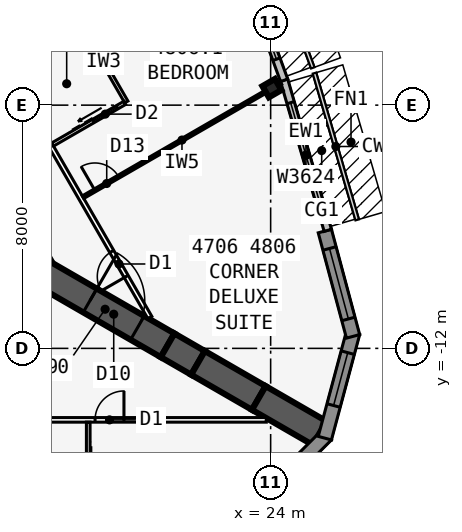
"""IFC4 building model, lengths in metres.
Left out: names, types, materials, properties, quantities, classifications, styles, units other than length and angle.
Written with IfcOpenShell. Run it as: python <this file> out.ifc"""

import sys

from ifc_helpers import new_model, si_unit, direction, frame, frame_2d, origin, origin_2d, place, context, subcontext, project, spatial, polyline, rectangle, i_section, outline, extrude, element, fill, save


model = new_model("IFC4")
c1 = context("Model", 3, precision=1e-05, world=origin(), true_north=direction((0.0, 1.0)))
c2 = subcontext(c1, "Body", "Model", "MODEL_VIEW")
j1 = project(units=[si_unit("LENGTHUNIT", "METRE"), si_unit("PLANEANGLEUNIT", "RADIAN")], contexts=[c1])
p1 = place(None, origin())
s1 = spatial("IfcSite", under=j1, at=p1, CompositionType="ELEMENT")
p2 = place(p1, origin())
s2 = spatial("IfcBuilding", under=s1, at=p2, CompositionType="ELEMENT")
p3 = place(p2, frame((0.0, 0.0, 175.9)))
s3 = spatial("IfcBuildingStorey", under=s2, at=p3, CompositionType="ELEMENT", Elevation=175.9)
p4 = place(p3, frame((16.5, -9.526, 0.0), z_axis=(0.0, 0.0, 1.0), x_axis=(-0.499999749417, 0.866025548458, 0.0)))
e1 = element("IfcWall", 1, at=p4, inside=s3, PredefinedType="SHEAR", context=c2, shape_type="SweptSolid", body=[
    extrude(rectangle(XDim=33.0, YDim=0.9, at=frame_2d((16.5, 0.0))), origin(), (0.0, 0.0, 1.0), 3.4),
])
p5 = place(p4, frame((14.15, 0.0, 0.0)))
e2 = element("IfcOpeningElement", 2, at=p5, cuts=e1, PredefinedType="OPENING", context=c2, shape_type="SweptSolid", body=[
    extrude(rectangle(XDim=1.8, YDim=2.13, at=frame_2d((0.9, 1.065))), frame((0.0, 0.46, 0.0), z_axis=(0.0, -1.0, 0.0), x_axis=(1.0, 0.0, 0.0)), (0.0, 0.0, 1.0), 0.92),
])
p6 = place(p4, frame((12.6, 0.0, 0.0)))
e3 = element("IfcOpeningElement", 3, at=p6, cuts=e1, PredefinedType="OPENING", context=c2, shape_type="SweptSolid", body=[
    extrude(rectangle(XDim=1.0, YDim=2.13, at=frame_2d((0.5, 1.065))), frame((0.0, 0.46, 0.0), z_axis=(0.0, -1.0, 0.0), x_axis=(1.0, 0.0, 0.0)), (0.0, 0.0, 1.0), 0.92),
])
p7 = place(p3, frame((16.5, -9.526, 0.0), z_axis=(0.0, 0.0, 1.0), x_axis=(0.866031398331, -0.499989616998, 0.0)))
e4 = element("IfcWall", 4, at=p7, inside=s3, PredefinedType="SHEAR", context=c2, shape_type="SweptSolid", body=[
    extrude(rectangle(XDim=4.746, YDim=0.9, at=frame_2d((2.373, 0.0))), origin(), (0.0, 0.0, 1.0), 3.4),
])
p8 = place(p7, frame((1.8, 0.0, 0.0)))
e5 = element("IfcOpeningElement", 5, at=p8, cuts=e4, PredefinedType="OPENING", context=c2, shape_type="SweptSolid", body=[
    extrude(rectangle(XDim=1.8, YDim=2.13, at=frame_2d((0.9, 1.065))), frame((0.0, 0.46, 0.0), z_axis=(0.0, -1.0, 0.0), x_axis=(1.0, 0.0, 0.0)), (0.0, 0.0, 1.0), 0.92),
])
p9 = place(p3, frame((20.61, -11.899, 0.0), z_axis=(0.0, 0.0, 1.0), x_axis=(0.866009537788, -0.500027479704, 0.0)))
e6 = element("IfcWall", 6, at=p9, inside=s3, PredefinedType="SHEAR", context=c2, shape_type="SweptSolid", body=[
    extrude(rectangle(XDim=1.155, YDim=0.9, at=frame_2d((0.577, 0.0))), origin(), (0.0, 0.0, 1.0), 3.4),
])
for number, where, z_axis, x_axis in (
    (7, (21.61, -12.477, 0.0), (0.0, 0.0, 1.0), (0.866, -0.5, 0.0)),
    (8, (23.61, -13.631, 0.0), (0.0, 0.0, 1.0), (0.866, -0.5, 0.0)),
):
    element("IfcWall", number, at=place(p3, frame(where, z_axis=z_axis, x_axis=x_axis)), inside=s3, PredefinedType="SHEAR", context=c2, shape_type="SweptSolid", body=[
        extrude(rectangle(XDim=2.309, YDim=0.9, at=frame_2d((1.155, 0.0))), origin(), (0.0, 0.0, 1.0), 3.4),
    ])
p10 = place(p3, frame((24.041, -3.44, 0.0), z_axis=(0.0, 0.0, 1.0), x_axis=(-0.5, 0.866025403784, 0.0)))
e9 = element("IfcColumn", 9, at=p10, inside=s3, PredefinedType="COLUMN", context=c2, shape_type="SweptSolid", body=[
    extrude(i_section(OverallWidth=0.424, OverallDepth=0.475, WebThickness=0.048, FlangeThickness=0.077, at=origin_2d()), origin(), (0.0, 0.0, 1.0), 3.4),
])
p11 = place(p3, frame((23.305, -17.388, 0.0), z_axis=(0.0, 0.0, 1.0), x_axis=(0.707106781187, 0.707106781187, 0.0)))
e10 = element("IfcWall", 10, at=p11, inside=s3, PredefinedType="SOLIDWALL", context=c2, shape_type="SweptSolid", body=[
    extrude(outline(polyline([(3.586, 0.225), (3.527, 0.225), (3.035, 0.093), (3.0, 0.225), (0.0, 0.225), (0.0, -0.225), (3.586, -0.225), (3.586, 0.225)])), origin(), (0.0, 0.0, 1.0), 3.235),
])
p12 = place(p11, frame((0.675, 0.0, 0.45)))
e11 = element("IfcOpeningElement", 11, at=p12, cuts=e10, PredefinedType="OPENING", context=c2, shape_type="SweptSolid", body=[
    extrude(rectangle(XDim=1.8, YDim=2.4, at=frame_2d((0.9, 1.2))), frame((0.0, 0.235, 0.0), z_axis=(0.0, -1.0, 0.0), x_axis=(1.0, 0.0, 0.0)), (0.0, 0.0, 1.0), 0.47),
])
p13 = place(p3, frame((25.783, -14.953, 0.0), z_axis=(0.0, 0.0, 1.0), x_axis=(0.258823421857, 0.965924653531, 0.0)))
e12 = element("IfcWall", 12, at=p13, inside=s3, PredefinedType="SOLIDWALL", context=c2, shape_type="SweptSolid", body=[
    extrude(outline(polyline([(3.586, 0.225), (0.586, 0.225), (0.551, 0.093), (0.06, 0.225), (0.0, 0.225), (0.0, -0.225), (3.586, -0.225), (3.586, 0.225)])), origin(), (0.0, 0.0, 1.0), 3.235),
])
p14 = place(p13, frame((1.111, 0.0, 0.45)))
e13 = element("IfcOpeningElement", 13, at=p14, cuts=e12, PredefinedType="OPENING", context=c2, shape_type="SweptSolid", body=[
    extrude(rectangle(XDim=1.8, YDim=2.4, at=frame_2d((0.9, 1.2))), frame((0.0, 0.235, 0.0), z_axis=(0.0, -1.0, 0.0), x_axis=(1.0, 0.0, 0.0)), (0.0, 0.0, 1.0), 0.47),
])
p15 = place(p3, frame((26.711, -11.605, 0.0), z_axis=(0.0, 0.0, 1.0), x_axis=(-0.258823421857, 0.965924653531, 0.0)))
e14 = element("IfcWall", 14, at=p15, inside=s3, PredefinedType="SOLIDWALL", context=c2, shape_type="SweptSolid", body=[
    extrude(rectangle(XDim=3.586, YDim=0.45, at=frame_2d((1.793, 0.0))), origin(), (0.0, 0.0, 1.0), 3.235),
])
p16 = place(p15, frame((0.593, 0.0, 0.45)))
e15 = element("IfcOpeningElement", 15, at=p16, cuts=e14, PredefinedType="OPENING", context=c2, shape_type="SweptSolid", body=[
    extrude(rectangle(XDim=2.4, YDim=2.4, at=frame_2d((1.2, 1.2))), frame((0.0, 0.235, 0.0), z_axis=(0.0, -1.0, 0.0), x_axis=(1.0, 0.0, 0.0)), (0.0, 0.0, 1.0), 0.47),
])
p17 = place(p3, frame((25.88, -8.118, 0.0), z_axis=(0.0, 0.0, 1.0), x_axis=(-0.279528287117, 0.960137457191, 0.0)))
e16 = element("IfcWall", 16, at=p17, inside=s3, PredefinedType="STANDARD", context=c2, shape_type="SweptSolid", body=[
    extrude(rectangle(XDim=5.148, YDim=0.25, at=frame_2d((2.574, 0.0))), origin(), (0.0, 0.0, 1.0), 3.235),
])
p18 = place(p17, frame((0.774, 0.0, 0.45)))
e17 = element("IfcOpeningElement", 17, at=p18, cuts=e16, PredefinedType="OPENING", context=c2, shape_type="SweptSolid", body=[
    extrude(rectangle(XDim=3.6, YDim=2.4, at=frame_2d((1.8, 1.2))), frame((0.0, 0.135, 0.0), z_axis=(0.0, -1.0, 0.0), x_axis=(1.0, 0.0, 0.0)), (0.0, 0.0, 1.0), 0.27),
])
p19 = place(p3, frame((24.444, -3.183, 0.0), z_axis=(0.0, 0.0, 1.0), x_axis=(-0.343225593282, 0.939252996863, 0.0)))
e18 = element("IfcWall", 18, at=p19, inside=s3, PredefinedType="STANDARD", context=c2, shape_type="SweptSolid", body=[
    extrude(rectangle(XDim=5.076, YDim=0.25, at=frame_2d((2.538, 0.0))), origin(), (0.0, 0.0, 1.0), 3.235),
])
p20 = place(p19, frame((0.738, 0.0, 0.45)))
e19 = element("IfcOpeningElement", 19, at=p20, cuts=e18, PredefinedType="OPENING", context=c2, shape_type="SweptSolid", body=[
    extrude(rectangle(XDim=3.6, YDim=2.4, at=frame_2d((1.8, 1.2))), frame((0.0, 0.135, 0.0), z_axis=(0.0, -1.0, 0.0), x_axis=(1.0, 0.0, 0.0)), (0.0, 0.0, 1.0), 0.27),
])
p21 = place(p3, frame((-23.857, -14.351, 0.0), z_axis=(0.0, 0.0, 1.0), x_axis=(1.0, 0.0, 0.0)))
e20 = element("IfcWall", 20, at=p21, inside=s3, PredefinedType="PARTITIONING", context=c2, shape_type="SweptSolid", body=[
    extrude(rectangle(XDim=47.714, YDim=0.15, at=frame_2d((23.857, 0.0))), origin(), (0.0, 0.0, 1.0), 3.235),
])
p22 = place(p21, frame((4.682, 0.0, 0.0)))
e21 = element("IfcOpeningElement", 21, at=p22, cuts=e20, PredefinedType="OPENING", context=c2, shape_type="SweptSolid", body=[
    extrude(rectangle(XDim=0.95, YDim=2.13, at=frame_2d((0.475, 1.065))), frame((0.0, 0.085, 0.0), z_axis=(0.0, -1.0, 0.0), x_axis=(1.0, 0.0, 0.0)), (0.0, 0.0, 1.0), 0.17),
])
p23 = place(p21, frame((10.282, 0.0, 0.0)))
e22 = element("IfcOpeningElement", 22, at=p23, cuts=e20, PredefinedType="OPENING", context=c2, shape_type="SweptSolid", body=[
    extrude(rectangle(XDim=0.95, YDim=2.13, at=frame_2d((0.475, 1.065))), frame((0.0, 0.085, 0.0), z_axis=(0.0, -1.0, 0.0), x_axis=(1.0, 0.0, 0.0)), (0.0, 0.0, 1.0), 0.17),
])
p24 = place(p21, frame((17.082, 0.0, 0.0)))
e23 = element("IfcOpeningElement", 23, at=p24, cuts=e20, PredefinedType="OPENING", context=c2, shape_type="SweptSolid", body=[
    extrude(rectangle(XDim=0.95, YDim=2.13, at=frame_2d((0.475, 1.065))), frame((0.0, 0.085, 0.0), z_axis=(0.0, -1.0, 0.0), x_axis=(1.0, 0.0, 0.0)), (0.0, 0.0, 1.0), 0.17),
])
p25 = place(p21, frame((25.857, 0.0, 0.0)))
e24 = element("IfcOpeningElement", 24, at=p25, cuts=e20, PredefinedType="OPENING", context=c2, shape_type="SweptSolid", body=[
    extrude(rectangle(XDim=1.0, YDim=2.13, at=frame_2d((0.5, 1.065))), frame((0.0, 0.085, 0.0), z_axis=(0.0, -1.0, 0.0), x_axis=(1.0, 0.0, 0.0)), (0.0, 0.0, 1.0), 0.17),
])
p26 = place(p21, frame((34.682, 0.0, 0.0)))
e25 = element("IfcOpeningElement", 25, at=p26, cuts=e20, PredefinedType="OPENING", context=c2, shape_type="SweptSolid", body=[
    extrude(rectangle(XDim=0.95, YDim=2.13, at=frame_2d((0.475, 1.065))), frame((0.0, 0.085, 0.0), z_axis=(0.0, -1.0, 0.0), x_axis=(1.0, 0.0, 0.0)), (0.0, 0.0, 1.0), 0.17),
])
p27 = place(p21, frame((42.082, 0.0, 0.0)))
e26 = element("IfcOpeningElement", 26, at=p27, cuts=e20, PredefinedType="OPENING", context=c2, shape_type="SweptSolid", body=[
    extrude(rectangle(XDim=0.95, YDim=2.13, at=frame_2d((0.475, 1.065))), frame((0.0, 0.085, 0.0), z_axis=(0.0, -1.0, 0.0), x_axis=(1.0, 0.0, 0.0)), (0.0, 0.0, 1.0), 0.17),
])
p28 = place(p3, frame((18.0, -14.426, 0.0), z_axis=(0.0, 0.0, 1.0), x_axis=(0.0, -1.0, 0.0)))
e27 = element("IfcWall", 27, at=p28, inside=s3, PredefinedType="PLUMBINGWALL", context=c2, shape_type="SweptSolid", body=[
    extrude(rectangle(XDim=2.74, YDim=0.12, at=frame_2d((1.37, 0.0))), origin(), (0.0, 0.0, 1.0), 3.235),
])
p29 = place(p28, frame((1.55, 0.0, 0.0)))
e28 = element("IfcOpeningElement", 28, at=p29, cuts=e27, PredefinedType="OPENING", context=c2, shape_type="SweptSolid", body=[
    extrude(rectangle(XDim=0.9, YDim=2.13, at=frame_2d((0.45, 1.065))), frame((0.0, 0.07, 0.0), z_axis=(0.0, -1.0, 0.0), x_axis=(1.0, 0.0, 0.0)), (0.0, 0.0, 1.0), 0.14),
])
p30 = place(p3, frame((20.027, -10.985, 0.0), z_axis=(0.0, 0.0, 1.0), x_axis=(-0.500001677587, 0.866024435227, 0.0)))
e29 = element("IfcWall", 29, at=p30, inside=s3, PredefinedType="PARTITIONING", context=c2, shape_type="SweptSolid", body=[
    extrude(rectangle(XDim=39.054, YDim=0.15, at=frame_2d((19.527, 0.0))), origin(), (0.0, 0.0, 1.0), 3.235),
])
p31 = place(p30, frame((1.558, 0.0, 0.0)))
e30 = element("IfcOpeningElement", 30, at=p31, cuts=e29, PredefinedType="OPENING", context=c2, shape_type="SweptSolid", body=[
    extrude(rectangle(XDim=0.95, YDim=2.13, at=frame_2d((0.475, 1.065))), frame((0.0, 0.085, 0.0), z_axis=(0.0, -1.0, 0.0), x_axis=(1.0, 0.0, 0.0)), (0.0, 0.0, 1.0), 0.17),
])
p32 = place(p30, frame((11.552, 0.0, 0.0)))
e31 = element("IfcOpeningElement", 31, at=p32, cuts=e29, PredefinedType="OPENING", context=c2, shape_type="SweptSolid", body=[
    extrude(rectangle(XDim=0.95, YDim=2.13, at=frame_2d((0.475, 1.065))), frame((0.0, 0.085, 0.0), z_axis=(0.0, -1.0, 0.0), x_axis=(1.0, 0.0, 0.0)), (0.0, 0.0, 1.0), 0.17),
])
p33 = place(p30, frame((25.352, 0.0, 0.0)))
e32 = element("IfcOpeningElement", 32, at=p33, cuts=e29, PredefinedType="OPENING", context=c2, shape_type="SweptSolid", body=[
    extrude(rectangle(XDim=0.95, YDim=2.13, at=frame_2d((0.475, 1.065))), frame((0.0, 0.085, 0.0), z_axis=(0.0, -1.0, 0.0), x_axis=(1.0, 0.0, 0.0)), (0.0, 0.0, 1.0), 0.17),
])
p34 = place(p30, frame((36.546, 0.0, 0.0)))
e33 = element("IfcOpeningElement", 33, at=p34, cuts=e29, PredefinedType="OPENING", context=c2, shape_type="SweptSolid", body=[
    extrude(rectangle(XDim=0.95, YDim=2.13, at=frame_2d((0.475, 1.065))), frame((0.0, 0.085, 0.0), z_axis=(0.0, -1.0, 0.0), x_axis=(1.0, 0.0, 0.0)), (0.0, 0.0, 1.0), 0.17),
])
p35 = place(p3, frame((17.829, -7.027, 0.0), z_axis=(0.0, 0.0, 1.0), x_axis=(0.866029804378, 0.499992377871, 0.0)))
e34 = element("IfcWall", 34, at=p35, inside=s3, PredefinedType="PARTITIONING", context=c2, shape_type="SweptSolid", body=[
    extrude(rectangle(XDim=7.516, YDim=0.1, at=frame_2d((3.758, 0.0))), origin(), (0.0, 0.0, 1.0), 2.389),
])
p36 = place(p35, frame((0.45, 0.0, 0.0)))
e35 = element("IfcOpeningElement", 35, at=p36, cuts=e34, PredefinedType="OPENING", context=c2, shape_type="SweptSolid", body=[
    extrude(rectangle(XDim=0.9, YDim=2.13, at=frame_2d((0.45, 1.065))), frame((0.0, 0.06, 0.0), z_axis=(0.0, -1.0, 0.0), x_axis=(1.0, 0.0, 0.0)), (0.0, 0.0, 1.0), 0.12),
])
p37 = place(p3, frame((15.329, -2.697, 0.0), z_axis=(0.0, 0.0, 1.0), x_axis=(0.866024316602, 0.50000188305, 0.0)))
e36 = element("IfcWall", 36, at=p37, inside=s3, PredefinedType="PARTITIONING", context=c2, shape_type="SweptSolid", body=[
    extrude(rectangle(XDim=8.395, YDim=0.15, at=frame_2d((4.198, 0.0))), origin(), (0.0, 0.0, 1.0), 2.389),
])
p38 = place(p3, frame((19.253, -3.895, 0.0), z_axis=(0.0, 0.0, 1.0), x_axis=(-0.499990139034, 0.866031096941, 0.0)))
e37 = element("IfcWall", 37, at=p38, inside=s3, PredefinedType="PLUMBINGWALL", context=c2, shape_type="SweptSolid", body=[
    extrude(rectangle(XDim=3.0, YDim=0.12, at=frame_2d((1.5, 0.0))), origin(), (0.0, 0.0, 1.0), 3.235),
])
p39 = place(p3, frame((16.829, -5.295, 0.0), z_axis=(0.0, 0.0, 1.0), x_axis=(0.866035715982, 0.499982138324, 0.0)))
e38 = element("IfcWall", 38, at=p39, inside=s3, PredefinedType="PLUMBINGWALL", context=c2, shape_type="SweptSolid", body=[
    extrude(rectangle(XDim=2.74, YDim=0.12, at=frame_2d((1.37, 0.0))), origin(), (0.0, 0.0, 1.0), 3.235),
])
p40 = place(p39, frame((1.55, 0.0, 0.0)))
e39 = element("IfcOpeningElement", 39, at=p40, cuts=e38, PredefinedType="OPENING", context=c2, shape_type="SweptSolid", body=[
    extrude(rectangle(XDim=0.9, YDim=2.13, at=frame_2d((0.45, 1.065))), frame((0.0, 0.07, 0.0), z_axis=(0.0, -1.0, 0.0), x_axis=(1.0, 0.0, 0.0)), (0.0, 0.0, 1.0), 0.14),
])
p41 = place(p14, origin())
e40 = element("IfcWindow", 40, at=p41, inside=s3, PartitioningType="SINGLE_PANEL", PredefinedType="WINDOW", context=c2, shape_type="SweptSolid", body=[
    extrude(rectangle(XDim=1.8, YDim=2.4, at=frame_2d((0.9, 1.2))), frame((0.0, 0.03, 0.0), z_axis=(0.0, -1.0, 0.0), x_axis=(1.0, 0.0, 0.0)), (0.0, 0.0, 1.0), 0.06),
])
fill(e13, e40)
p42 = place(p16, origin())
e41 = element("IfcWindow", 41, at=p42, inside=s3, PartitioningType="SINGLE_PANEL", PredefinedType="WINDOW", context=c2, shape_type="SweptSolid", body=[
    extrude(rectangle(XDim=2.4, YDim=2.4, at=frame_2d((1.2, 1.2))), frame((0.0, 0.03, 0.0), z_axis=(0.0, -1.0, 0.0), x_axis=(1.0, 0.0, 0.0)), (0.0, 0.0, 1.0), 0.06),
])
fill(e15, e41)
p43 = place(p18, origin())
e42 = element("IfcWindow", 42, at=p43, inside=s3, PartitioningType="SINGLE_PANEL", PredefinedType="WINDOW", context=c2, shape_type="SweptSolid", body=[
    extrude(rectangle(XDim=3.6, YDim=2.4, at=frame_2d((1.8, 1.2))), frame((0.0, 0.03, 0.0), z_axis=(0.0, -1.0, 0.0), x_axis=(1.0, 0.0, 0.0)), (0.0, 0.0, 1.0), 0.06),
])
fill(e17, e42)
p44 = place(p20, origin())
e43 = element("IfcWindow", 43, at=p44, inside=s3, PartitioningType="SINGLE_PANEL", PredefinedType="WINDOW", context=c2, shape_type="SweptSolid", body=[
    extrude(rectangle(XDim=3.6, YDim=2.4, at=frame_2d((1.8, 1.2))), frame((0.0, 0.03, 0.0), z_axis=(0.0, -1.0, 0.0), x_axis=(1.0, 0.0, 0.0)), (0.0, 0.0, 1.0), 0.06),
])
fill(e19, e43)
p45 = place(p27, origin())
e44 = element("IfcDoor", 44, at=p45, inside=s3, OperationType="SINGLE_SWING_RIGHT", PredefinedType="DOOR", context=c2, shape_type="SweptSolid", body=[
    extrude(rectangle(XDim=0.95, YDim=2.13, at=frame_2d((0.475, 1.065))), frame((0.0, 0.025, 0.0), z_axis=(0.0, -1.0, 0.0), x_axis=(1.0, 0.0, 0.0)), (0.0, 0.0, 1.0), 0.05),
])
fill(e26, e44)
p46 = place(p36, origin())
e45 = element("IfcDoor", 45, at=p46, inside=s3, OperationType="SINGLE_SWING_LEFT", PredefinedType="DOOR", context=c2, shape_type="SweptSolid", body=[
    extrude(rectangle(XDim=0.9, YDim=2.13, at=frame_2d((0.45, 1.065))), frame((0.0, 0.025, 0.0), z_axis=(0.0, -1.0, 0.0), x_axis=(1.0, 0.0, 0.0)), (0.0, 0.0, 1.0), 0.05),
])
fill(e35, e45)
p47 = place(p31, origin())
e46 = element("IfcDoor", 46, at=p47, inside=s3, OperationType="SINGLE_SWING_LEFT", PredefinedType="DOOR", context=c2, shape_type="SweptSolid", body=[
    extrude(rectangle(XDim=0.95, YDim=2.13, at=frame_2d((0.475, 1.065))), frame((0.0, 0.025, 0.0), z_axis=(0.0, -1.0, 0.0), x_axis=(1.0, 0.0, 0.0)), (0.0, 0.0, 1.0), 0.05),
])
fill(e30, e46)
p48 = place(p40, origin())
e47 = element("IfcDoor", 47, at=p48, inside=s3, OperationType="SLIDING_TO_LEFT", PredefinedType="DOOR", context=c2, shape_type="SweptSolid", body=[
    extrude(rectangle(XDim=0.9, YDim=2.13, at=frame_2d((0.45, 1.065))), frame((0.0, 0.025, 0.0), z_axis=(0.0, -1.0, 0.0), x_axis=(1.0, 0.0, 0.0)), (0.0, 0.0, 1.0), 0.05),
])
fill(e39, e47)
p49 = place(p8, origin())
e48 = element("IfcDoor", 48, at=p49, inside=s3, OperationType="DOUBLE_DOOR_DOUBLE_SWING", PredefinedType="DOOR", context=c2, shape_type="SweptSolid", body=[
    extrude(rectangle(XDim=1.8, YDim=2.13, at=frame_2d((0.9, 1.065))), frame((0.0, 0.025, 0.0), z_axis=(0.0, -1.0, 0.0), x_axis=(1.0, 0.0, 0.0)), (0.0, 0.0, 1.0), 0.05),
])
fill(e5, e48)
save(model, sys.argv[1])
